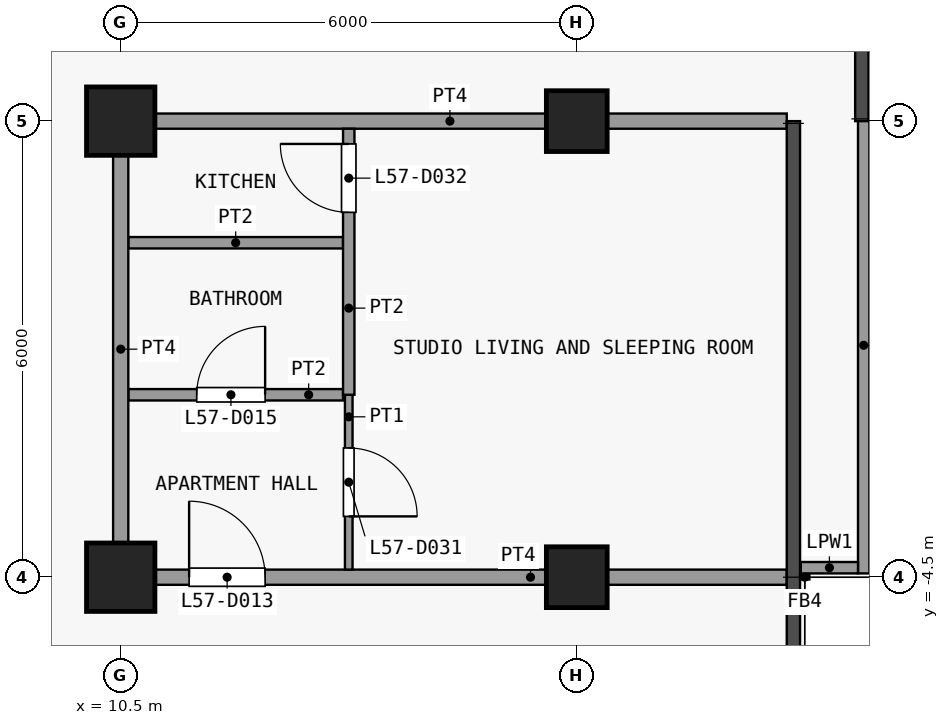
"""IFC4 building model, lengths in metres.
Left out: names, types, materials, properties, quantities, classifications, styles, units other than length and angle.
Written with IfcOpenShell. Run it as: python <this file> out.ifc"""

import sys

from ifc_helpers import new_model, si_unit, direction, frame, frame_2d, origin, origin_2d, place, context, subcontext, project, spatial, rectangle, extrude, element, fill, save


model = new_model("IFC4")
c1 = context("Model", 3, precision=1e-05, world=origin(), true_north=direction((0.0, 1.0)))
c2 = subcontext(c1, "Body", "Model", "MODEL_VIEW")
j1 = project(units=[si_unit("LENGTHUNIT", "METRE"), si_unit("PLANEANGLEUNIT", "RADIAN")], contexts=[c1])
p1 = place(None, origin())
s1 = spatial("IfcSite", under=j1, at=p1, CompositionType="ELEMENT")
p2 = place(p1, origin())
s2 = spatial("IfcBuilding", under=s1, at=p2, CompositionType="ELEMENT")
p3 = place(p2, frame((0.0, 0.0, 226.7)))
s3 = spatial("IfcBuildingStorey", under=s2, at=p3, CompositionType="ELEMENT", Elevation=226.7)
for number, where, z_axis, x_axis in (
    (1, (10.5, -4.5, 0.0), (0.0, 0.0, 1.0), (1.0, 0.0, 0.0)),
    (2, (10.5, 1.5, 0.0), (0.0, 0.0, 1.0), (1.0, 0.0, 0.0)),
):
    element("IfcColumn", number, at=place(p3, frame(where, z_axis=z_axis, x_axis=x_axis)), inside=s3, PredefinedType="COLUMN", context=c2, shape_type="SweptSolid", body=[
        extrude(rectangle(XDim=0.9, YDim=0.9, at=origin_2d()), origin(), (0.0, 0.0, 1.0), 3.6),
    ])
for number, where, z_axis, x_axis in (
    (3, (16.5, -4.5, 0.0), (0.0, 0.0, 1.0), (1.0, 0.0, 0.0)),
    (4, (16.5, 1.5, 0.0), (0.0, 0.0, 1.0), (1.0, 0.0, 0.0)),
):
    element("IfcColumn", number, at=place(p3, frame(where, z_axis=z_axis, x_axis=x_axis)), inside=s3, PredefinedType="COLUMN", context=c2, shape_type="SweptSolid", body=[
        extrude(rectangle(XDim=0.8, YDim=0.8, at=origin_2d()), origin(), (0.0, 0.0, 1.0), 3.6),
    ])
p4 = place(p3, frame((20.275, 1.552, 0.0), z_axis=(0.0, 0.0, 1.0), x_axis=(0.0, -1.0, 0.0)))
e5 = element("IfcWall", 5, at=p4, inside=s3, PredefinedType="PARAPET", context=c2, shape_type="SweptSolid", body=[
    extrude(rectangle(XDim=6.002, YDim=0.15, at=frame_2d((3.001, 0.0))), origin(), (0.0, 0.0, 1.0), 1.15),
])
p5 = place(p3, frame((20.2, -4.375, 0.0), z_axis=(0.0, 0.0, 1.0), x_axis=(-1.0, 0.0, 0.0)))
e6 = element("IfcWall", 6, at=p5, inside=s3, PredefinedType="PARAPET", context=c2, shape_type="SweptSolid", body=[
    extrude(rectangle(XDim=0.752, YDim=0.15, at=frame_2d((0.376, 0.0))), origin(), (0.0, 0.0, 1.0), 1.15),
])
p6 = place(p3, frame((10.4, -4.5, 0.0), z_axis=(0.0, 0.0, 1.0), x_axis=(1.0, 0.0, 0.0)))
e7 = element("IfcWall", 7, at=p6, inside=s3, PredefinedType="PARTITIONING", context=c2, shape_type="SweptSolid", body=[
    extrude(rectangle(XDim=8.863, YDim=0.2, at=frame_2d((4.431, 0.0))), origin(), (0.0, 0.0, 1.0), 3.3),
])
p7 = place(p6, frame((1.0, 0.0, 0.0)))
e8 = element("IfcOpeningElement", 8, at=p7, cuts=e7, PredefinedType="OPENING", context=c2, shape_type="SweptSolid", body=[
    extrude(rectangle(XDim=1.0, YDim=2.1, at=frame_2d((0.5, 1.05))), frame((0.0, 0.11, 0.0), z_axis=(0.0, -1.0, 0.0), x_axis=(1.0, 0.0, 0.0)), (0.0, 0.0, 1.0), 0.22),
])
p8 = place(p3, frame((10.6, -2.1, 0.0), z_axis=(0.0, 0.0, 1.0), x_axis=(1.0, 0.0, 0.0)))
e9 = element("IfcWall", 9, at=p8, inside=s3, PredefinedType="PARTITIONING", context=c2, shape_type="SweptSolid", body=[
    extrude(rectangle(XDim=2.825, YDim=0.15, at=frame_2d((1.413, 0.0))), origin(), (0.0, 0.0, 1.0), 3.3),
])
p9 = place(p8, frame((0.9, 0.0, 0.0)))
e10 = element("IfcOpeningElement", 10, at=p9, cuts=e9, PredefinedType="OPENING", context=c2, shape_type="SweptSolid", body=[
    extrude(rectangle(XDim=0.9, YDim=2.1, at=frame_2d((0.45, 1.05))), frame((0.0, 0.085, 0.0), z_axis=(0.0, -1.0, 0.0), x_axis=(1.0, 0.0, 0.0)), (0.0, 0.0, 1.0), 0.17),
])
p10 = place(p3, frame((10.6, -0.1, 0.0), z_axis=(0.0, 0.0, 1.0), x_axis=(1.0, 0.0, 0.0)))
e11 = element("IfcWall", 11, at=p10, inside=s3, PredefinedType="PARTITIONING", context=c2, shape_type="SweptSolid", body=[
    extrude(rectangle(XDim=2.825, YDim=0.15, at=frame_2d((1.413, 0.0))), origin(), (0.0, 0.0, 1.0), 3.3),
])
p11 = place(p3, frame((10.4, 1.5, 0.0), z_axis=(0.0, 0.0, 1.0), x_axis=(1.0, 0.0, 0.0)))
e12 = element("IfcWall", 12, at=p11, inside=s3, PredefinedType="PARTITIONING", context=c2, shape_type="SweptSolid", body=[
    extrude(rectangle(XDim=8.863, YDim=0.2, at=frame_2d((4.431, 0.0))), origin(), (0.0, 0.0, 1.0), 3.3),
])
p12 = place(p3, frame((10.5, -4.4, 0.0), z_axis=(0.0, 0.0, 1.0), x_axis=(0.0, 1.0, 0.0)))
e13 = element("IfcWall", 13, at=p12, inside=s3, PredefinedType="PARTITIONING", context=c2, shape_type="SweptSolid", body=[
    extrude(rectangle(XDim=5.8, YDim=0.2, at=frame_2d((2.9, 0.0))), origin(), (0.0, 0.0, 1.0), 3.3),
])
p13 = place(p3, frame((13.5, -4.4, 0.0), z_axis=(0.0, 0.0, 1.0), x_axis=(0.0, 1.0, 0.0)))
e14 = element("IfcWall", 14, at=p13, inside=s3, PredefinedType="PARTITIONING", context=c2, shape_type="SweptSolid", body=[
    extrude(rectangle(XDim=2.3, YDim=0.1, at=frame_2d((1.15, 0.0))), origin(), (0.0, 0.0, 1.0), 3.3),
])
p14 = place(p13, frame((0.7, 0.0, 0.0)))
e15 = element("IfcOpeningElement", 15, at=p14, cuts=e14, PredefinedType="OPENING", context=c2, shape_type="SweptSolid", body=[
    extrude(rectangle(XDim=0.9, YDim=2.1, at=frame_2d((0.45, 1.05))), frame((0.0, 0.06, 0.0), z_axis=(0.0, -1.0, 0.0), x_axis=(1.0, 0.0, 0.0)), (0.0, 0.0, 1.0), 0.12),
])
p15 = place(p3, frame((13.5, -2.1, 0.0), z_axis=(0.0, 0.0, 1.0), x_axis=(0.0, 1.0, 0.0)))
e16 = element("IfcWall", 16, at=p15, inside=s3, PredefinedType="PARTITIONING", context=c2, shape_type="SweptSolid", body=[
    extrude(rectangle(XDim=3.5, YDim=0.15, at=frame_2d((1.75, 0.0))), origin(), (0.0, 0.0, 1.0), 3.3),
])
p16 = place(p15, frame((2.4, 0.0, 0.0)))
e17 = element("IfcOpeningElement", 17, at=p16, cuts=e16, PredefinedType="OPENING", context=c2, shape_type="SweptSolid", body=[
    extrude(rectangle(XDim=0.9, YDim=2.1, at=frame_2d((0.45, 1.05))), frame((0.0, 0.085, 0.0), z_axis=(0.0, -1.0, 0.0), x_axis=(1.0, 0.0, 0.0)), (0.0, 0.0, 1.0), 0.17),
])
p17 = place(p7, origin())
e18 = element("IfcDoor", 18, at=p17, inside=s3, OperationType="SINGLE_SWING_RIGHT", PredefinedType="DOOR", context=c2, shape_type="SweptSolid", body=[
    extrude(rectangle(XDim=1.0, YDim=2.1, at=frame_2d((0.5, 1.05))), frame((0.0, 0.025, 0.0), z_axis=(0.0, -1.0, 0.0), x_axis=(1.0, 0.0, 0.0)), (0.0, 0.0, 1.0), 0.05),
])
fill(e8, e18)
p18 = place(p9, origin())
e19 = element("IfcDoor", 19, at=p18, inside=s3, OperationType="SINGLE_SWING_LEFT", PredefinedType="DOOR", context=c2, shape_type="SweptSolid", body=[
    extrude(rectangle(XDim=0.9, YDim=2.1, at=frame_2d((0.45, 1.05))), frame((0.0, 0.025, 0.0), z_axis=(0.0, -1.0, 0.0), x_axis=(1.0, 0.0, 0.0)), (0.0, 0.0, 1.0), 0.05),
])
fill(e10, e19)
p19 = place(p14, origin())
e20 = element("IfcDoor", 20, at=p19, inside=s3, OperationType="SINGLE_SWING_LEFT", PredefinedType="DOOR", context=c2, shape_type="SweptSolid", body=[
    extrude(rectangle(XDim=0.9, YDim=2.1, at=frame_2d((0.45, 1.05))), frame((0.0, 0.025, 0.0), z_axis=(0.0, -1.0, 0.0), x_axis=(1.0, 0.0, 0.0)), (0.0, 0.0, 1.0), 0.05),
])
fill(e15, e20)
p20 = place(p16, origin())
e21 = element("IfcDoor", 21, at=p20, inside=s3, OperationType="SINGLE_SWING_LEFT", PredefinedType="DOOR", context=c2, shape_type="SweptSolid", body=[
    extrude(rectangle(XDim=0.9, YDim=2.1, at=frame_2d((0.45, 1.05))), frame((0.0, 0.025, 0.0), z_axis=(0.0, -1.0, 0.0), x_axis=(1.0, 0.0, 0.0)), (0.0, 0.0, 1.0), 0.05),
])
fill(e17, e21)
save(model, sys.argv[1])
